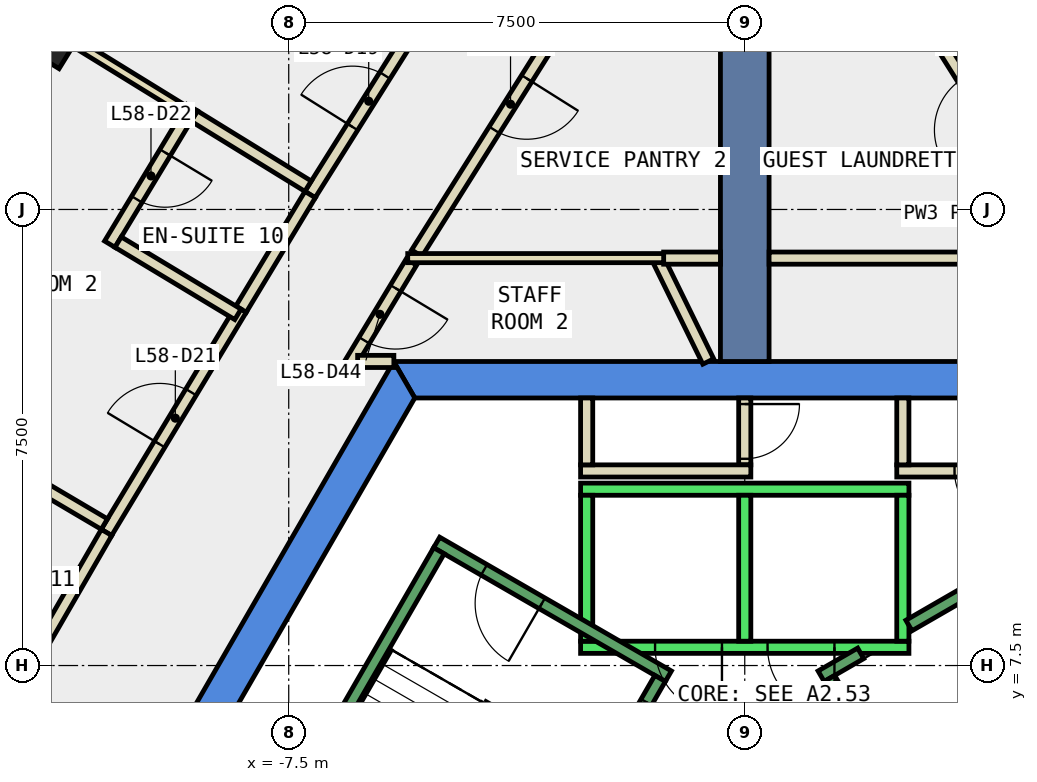
"""IFC4 building model, lengths in metres.
Left out: names, types, materials, properties, quantities, classifications, styles, units other than length and angle.
Written with IfcOpenShell. Run it as: python <this file> out.ifc"""

import sys

from ifc_helpers import new_model, si_unit, direction, frame, frame_2d, origin, origin_2d, place, context, subcontext, project, spatial, polyline, rectangle, outline, extrude, element, fill, save


model = new_model("IFC4")
c1 = context("Model", 3, precision=1e-05, world=origin(), true_north=direction((0.0, 1.0)))
c2 = subcontext(c1, "Body", "Model", "MODEL_VIEW")
j1 = project(units=[si_unit("LENGTHUNIT", "METRE"), si_unit("PLANEANGLEUNIT", "RADIAN")], contexts=[c1])
p1 = place(None, origin())
s1 = spatial("IfcSite", under=j1, at=p1, CompositionType="ELEMENT")
p2 = place(p1, origin())
s2 = spatial("IfcBuilding", under=s1, at=p2, CompositionType="ELEMENT")
p3 = place(p2, frame((0.0, 0.0, 255.8)))
s3 = spatial("IfcBuildingStorey", under=s2, at=p3, CompositionType="ELEMENT", Elevation=255.8)
p4 = place(p3, frame((-11.61, 18.109, -0.34), z_axis=(0.0, 0.0, 1.0), x_axis=(0.525575593337, 0.850746904601, 0.0)))
e1 = element("IfcColumn", 1, at=p4, inside=s3, PredefinedType="COLUMN", context=c2, shape_type="SweptSolid", body=[
    extrude(rectangle(XDim=1.0, YDim=1.4, at=origin_2d()), origin(), (0.0, 0.0, 1.0), 3.6),
])
p5 = place(p3, frame((0.0, 0.0, -0.34)))
e2 = element("IfcWall", 2, at=p5, inside=s3, PredefinedType="SHEAR", context=c2, shape_type="SweptSolid", body=[
    extrude(outline(polyline([(5.774, 12.5), (-5.774, 12.5), (-5.427, 11.9), (5.427, 11.9), (5.774, 12.5)])), origin(), (0.0, 0.0, 1.0), 3.6),
])
p6 = place(p3, frame((0.0, 0.0, -0.34)))
e3 = element("IfcWall", 3, at=p6, inside=s3, PredefinedType="SHEAR", context=c2, shape_type="SweptSolid", body=[
    extrude(outline(polyline([(-10.535, 4.253), (-10.015, 3.953), (-5.427, 11.9), (-5.774, 12.5), (-10.535, 4.253)])), origin(), (0.0, 0.0, 1.0), 3.6),
])
p7 = place(p3, frame((0.0, 12.5, -0.34), z_axis=(0.0, 0.0, 1.0), x_axis=(0.0, 1.0, 0.0)))
e4 = element("IfcWall", 4, at=p7, inside=s3, PredefinedType="SHEAR", context=c2, shape_type="SweptSolid", body=[
    extrude(rectangle(XDim=9.0, YDim=0.8, at=frame_2d((4.5, 0.0))), origin(), (0.0, 0.0, 1.0), 3.6),
])
p8 = place(p3, frame((-0.6, 12.5, 0.0), z_axis=(0.0, 0.0, 1.0), x_axis=(-0.440531456598, 0.897737175206, 0.0)))
e5 = element("IfcWall", 5, at=p8, inside=s3, PredefinedType="PARTITIONING", context=c2, shape_type="SweptSolid", body=[
    extrude(rectangle(XDim=1.918, YDim=0.2, at=frame_2d((0.959, 0.0))), origin(), (0.0, 0.0, 1.0), 3.26),
])
p9 = place(p3, frame((-5.482, 14.136, 0.0), z_axis=(0.0, 0.0, 1.0), x_axis=(-0.516156559549, -0.856494253357, 0.0)))
e6 = element("IfcWall", 6, at=p9, inside=s3, PredefinedType="PARTITIONING", context=c2, shape_type="SweptSolid", body=[
    extrude(rectangle(XDim=2.009, YDim=0.2, at=frame_2d((1.005, 0.0))), origin(), (0.0, 0.0, 1.0), 3.26),
])
p10 = place(p9, frame((0.504, 0.0, 0.0)))
e7 = element("IfcOpeningElement", 7, at=p10, cuts=e6, PredefinedType="OPENING", context=c2, shape_type="SweptSolid", body=[
    extrude(rectangle(XDim=1.0, YDim=2.1, at=frame_2d((0.5, 1.05))), frame((0.0, 0.11, 0.0), z_axis=(0.0, -1.0, 0.0), x_axis=(1.0, 0.0, 0.0)), (0.0, 0.0, 1.0), 0.22),
])
p11 = place(p3, frame((-6.367, 12.501, 0.0), z_axis=(0.0, 0.0, 1.0), x_axis=(1.0, 0.0, 0.0)))
e8 = element("IfcWall", 8, at=p11, inside=s3, PredefinedType="PARTITIONING", context=c2, shape_type="SweptSolid", body=[
    extrude(rectangle(XDim=0.596, YDim=0.2, at=frame_2d((0.298, 0.0))), origin(), (0.0, 0.0, 1.0), 3.26),
])
p12 = place(p3, frame((0.4, 14.2, 0.0), z_axis=(0.0, 0.0, 1.0), x_axis=(1.0, 0.0, 0.0)))
e9 = element("IfcWall", 9, at=p12, inside=s3, PredefinedType="PARTITIONING", context=c2, shape_type="SweptSolid", body=[
    extrude(rectangle(XDim=5.143, YDim=0.2, at=frame_2d((2.572, 0.0))), origin(), (0.0, 0.0, 1.0), 3.26),
])
p13 = place(p3, frame((5.394, 14.281, 0.0), z_axis=(0.0, 0.0, 1.0), x_axis=(-0.532551510955, 0.846397594621, 0.0)))
e10 = element("IfcWall", 10, at=p13, inside=s3, PredefinedType="PARTITIONING", context=c2, shape_type="SweptSolid", body=[
    extrude(rectangle(XDim=5.789, YDim=0.2, at=frame_2d((2.895, 0.0))), origin(), (0.0, 0.0, 1.0), 3.26),
])
p14 = place(p13, frame((2.394, 0.0, 0.0)))
e11 = element("IfcOpeningElement", 11, at=p14, cuts=e10, PredefinedType="OPENING", context=c2, shape_type="SweptSolid", body=[
    extrude(rectangle(XDim=1.0, YDim=2.1, at=frame_2d((0.5, 1.05))), frame((0.0, 0.11, 0.0), z_axis=(0.0, -1.0, 0.0), x_axis=(1.0, 0.0, 0.0)), (0.0, 0.0, 1.0), 0.22),
])
p15 = place(p3, frame((-1.334, 14.2, 0.0), z_axis=(0.0, 0.0, 1.0), x_axis=(1.0, 0.0, 0.0)))
e12 = element("IfcWall", 12, at=p15, inside=s3, PredefinedType="PARTITIONING", context=c2, shape_type="SweptSolid", body=[
    extrude(rectangle(XDim=0.934, YDim=0.2, at=frame_2d((0.467, 0.0))), origin(), (0.0, 0.0, 1.0), 3.26),
])
p16 = place(p3, frame((-2.311, 19.181, 0.0), z_axis=(0.0, 0.0, 1.0), x_axis=(-0.532551510955, -0.846397594621, 0.0)))
e13 = element("IfcWall", 13, at=p16, inside=s3, PredefinedType="PARTITIONING", context=c2, shape_type="SweptSolid", body=[
    extrude(rectangle(XDim=5.789, YDim=0.2, at=frame_2d((2.895, 0.0))), origin(), (0.0, 0.0, 1.0), 3.26),
])
p17 = place(p16, frame((2.394, 0.0, 0.0)))
e14 = element("IfcOpeningElement", 14, at=p17, cuts=e13, PredefinedType="OPENING", context=c2, shape_type="SweptSolid", body=[
    extrude(rectangle(XDim=1.0, YDim=2.1, at=frame_2d((0.5, 1.05))), frame((0.0, 0.11, 0.0), z_axis=(0.0, -1.0, 0.0), x_axis=(1.0, 0.0, 0.0)), (0.0, 0.0, 1.0), 0.22),
])
p18 = place(p3, frame((-7.15, 15.246, 0.0), z_axis=(0.0, 0.0, 1.0), x_axis=(0.532449518014, 0.846461759778, 0.0)))
e15 = element("IfcWall", 15, at=p18, inside=s3, PredefinedType="PARTITIONING", context=c2, shape_type="SweptSolid", body=[
    extrude(rectangle(XDim=3.525, YDim=0.2, at=frame_2d((1.763, 0.0))), origin(), (0.0, 0.0, 1.0), 3.26),
])
p19 = place(p18, frame((1.313, 0.0, 0.0)))
e16 = element("IfcOpeningElement", 16, at=p19, cuts=e15, PredefinedType="OPENING", context=c2, shape_type="SweptSolid", body=[
    extrude(rectangle(XDim=1.0, YDim=2.1, at=frame_2d((0.5, 1.05))), frame((0.0, 0.11, 0.0), z_axis=(0.0, -1.0, 0.0), x_axis=(1.0, 0.0, 0.0)), (0.0, 0.0, 1.0), 0.22),
])
p20 = place(p3, frame((-10.498, 9.689, 0.0), z_axis=(0.0, 0.0, 1.0), x_axis=(0.516353342298, 0.856375633643, 0.0)))
e17 = element("IfcWall", 17, at=p20, inside=s3, PredefinedType="PARTITIONING", context=c2, shape_type="SweptSolid", body=[
    extrude(rectangle(XDim=4.288, YDim=0.2, at=frame_2d((2.144, 0.0))), origin(), (0.0, 0.0, 1.0), 3.26),
])
p21 = place(p20, frame((1.694, 0.0, 0.0)))
e18 = element("IfcOpeningElement", 18, at=p21, cuts=e17, PredefinedType="OPENING", context=c2, shape_type="SweptSolid", body=[
    extrude(rectangle(XDim=1.0, YDim=2.1, at=frame_2d((0.5, 1.05))), frame((0.0, 0.11, 0.0), z_axis=(0.0, -1.0, 0.0), x_axis=(1.0, 0.0, 0.0)), (0.0, 0.0, 1.0), 0.22),
])
p22 = place(p3, frame((-8.284, 13.361, 0.0), z_axis=(0.0, 0.0, 1.0), x_axis=(0.516354965559, 0.856374654893, 0.0)))
e19 = element("IfcWall", 19, at=p22, inside=s3, PredefinedType="PARTITIONING", context=c2, shape_type="SweptSolid", body=[
    extrude(rectangle(XDim=2.2, YDim=0.2, at=frame_2d((1.1, 0.0))), origin(), (0.0, 0.0, 1.0), 3.26),
])
p23 = place(p3, frame((-11.696, 7.61, 0.0), z_axis=(0.0, 0.0, 1.0), x_axis=(0.500089422704, 0.865973769406, 0.0)))
e20 = element("IfcWall", 20, at=p23, inside=s3, PredefinedType="PARTITIONING", context=c2, shape_type="SweptSolid", body=[
    extrude(rectangle(XDim=2.399, YDim=0.2, at=frame_2d((1.2, 0.0))), origin(), (0.0, 0.0, 1.0), 3.26),
])
p24 = place(p3, frame((5.3, 10.7, 0.0), z_axis=(0.0, 0.0, 1.0), x_axis=(-1.0, 0.0, 0.0)))
e21 = element("IfcWall", 21, at=p24, inside=s3, PredefinedType="PARTITIONING", context=c2, shape_type="SweptSolid", body=[
    extrude(rectangle(XDim=2.8, YDim=0.2, at=frame_2d((1.4, 0.0))), origin(), (0.0, 0.0, 1.0), 3.26),
])
p25 = place(p24, frame((0.95, 0.0, 0.0)))
e22 = element("IfcOpeningElement", 22, at=p25, cuts=e21, PredefinedType="OPENING", context=c2, shape_type="SweptSolid", body=[
    extrude(rectangle(XDim=0.9, YDim=2.1, at=frame_2d((0.45, 1.05))), frame((0.0, 0.11, 0.0), z_axis=(0.0, -1.0, 0.0), x_axis=(1.0, 0.0, 0.0)), (0.0, 0.0, 1.0), 0.22),
])
p26 = place(p3, frame((2.6, 10.8, 0.0), z_axis=(0.0, 0.0, 1.0), x_axis=(0.0, 1.0, 0.0)))
e23 = element("IfcWall", 23, at=p26, inside=s3, PredefinedType="PARTITIONING", context=c2, shape_type="SweptSolid", body=[
    extrude(rectangle(XDim=1.1, YDim=0.2, at=frame_2d((0.55, 0.0))), origin(), (0.0, 0.0, 1.0), 3.26),
])
p27 = place(p3, frame((0.0, 11.9, 0.0), z_axis=(0.0, 0.0, 1.0), x_axis=(0.0, -1.0, 0.0)))
e24 = element("IfcWall", 24, at=p27, inside=s3, PredefinedType="PARTITIONING", context=c2, shape_type="SweptSolid", body=[
    extrude(rectangle(XDim=1.1, YDim=0.2, at=frame_2d((0.55, 0.0))), origin(), (0.0, 0.0, 1.0), 3.26),
])
p28 = place(p27, frame((0.1, 0.0, 0.0)))
e25 = element("IfcOpeningElement", 25, at=p28, cuts=e24, PredefinedType="OPENING", context=c2, shape_type="SweptSolid", body=[
    extrude(rectangle(XDim=0.9, YDim=2.1, at=frame_2d((0.45, 1.05))), frame((0.0, 0.11, 0.0), z_axis=(0.0, -1.0, 0.0), x_axis=(1.0, 0.0, 0.0)), (0.0, 0.0, 1.0), 0.22),
])
p29 = place(p3, frame((0.1, 10.7, 0.0), z_axis=(0.0, 0.0, 1.0), x_axis=(-1.0, 0.0, 0.0)))
e26 = element("IfcWall", 26, at=p29, inside=s3, PredefinedType="PARTITIONING", context=c2, shape_type="SweptSolid", body=[
    extrude(rectangle(XDim=2.8, YDim=0.2, at=frame_2d((1.4, 0.0))), origin(), (0.0, 0.0, 1.0), 3.26),
])
p30 = place(p3, frame((-2.6, 10.8, 0.0), z_axis=(0.0, 0.0, 1.0), x_axis=(0.0, 1.0, 0.0)))
e27 = element("IfcWall", 27, at=p30, inside=s3, PredefinedType="PARTITIONING", context=c2, shape_type="SweptSolid", body=[
    extrude(rectangle(XDim=1.1, YDim=0.2, at=frame_2d((0.55, 0.0))), origin(), (0.0, 0.0, 1.0), 3.26),
])
p31 = place(p3, frame((-1.334, 14.2, 0.0), z_axis=(0.0, 0.0, 1.0), x_axis=(-1.0, 0.0, 0.0)))
e28 = element("IfcWall", 28, at=p31, inside=s3, PredefinedType="PARTITIONING", context=c2, shape_type="SweptSolid", body=[
    extrude(rectangle(XDim=4.209, YDim=0.15, at=frame_2d((2.104, 0.0))), origin(), (0.0, 0.0, 1.0), 3.26),
])
p32 = place(p3, frame((-9.225, 16.641, 0.0), z_axis=(0.0, 0.0, 1.0), x_axis=(-0.85144868382, 0.524437926566, 0.0)))
e29 = element("IfcWall", 29, at=p32, inside=s3, PredefinedType="PARTITIONING", context=c2, shape_type="SweptSolid", body=[
    extrude(rectangle(XDim=2.08, YDim=0.15, at=frame_2d((1.04, 0.0))), origin(), (0.0, 0.0, 1.0), 3.26),
])
p33 = place(p3, frame((-7.182, 15.383, 0.0), z_axis=(0.0, 0.0, 1.0), x_axis=(-0.851498142432, 0.524357619792, 0.0)))
e30 = element("IfcWall", 30, at=p33, inside=s3, PredefinedType="PARTITIONING", context=c2, shape_type="SweptSolid", body=[
    extrude(rectangle(XDim=2.198, YDim=0.2, at=frame_2d((1.099, 0.0))), origin(), (0.0, 0.0, 1.0), 3.26),
])
p34 = place(p3, frame((-9.088, 16.674, 0.0), z_axis=(0.0, 0.0, 1.0), x_axis=(-0.516780274192, -0.856118069081, 0.0)))
e31 = element("IfcWall", 31, at=p34, inside=s3, PredefinedType="PARTITIONING", context=c2, shape_type="SweptSolid", body=[
    extrude(rectangle(XDim=2.623, YDim=0.2, at=frame_2d((1.311, 0.0))), origin(), (0.0, 0.0, 1.0), 3.26),
])
p35 = place(p34, frame((0.861, 0.0, 0.0)))
e32 = element("IfcOpeningElement", 32, at=p35, cuts=e31, PredefinedType="OPENING", context=c2, shape_type="SweptSolid", body=[
    extrude(rectangle(XDim=0.9, YDim=2.1, at=frame_2d((0.45, 1.05))), frame((0.0, 0.11, 0.0), z_axis=(0.0, -1.0, 0.0), x_axis=(1.0, 0.0, 0.0)), (0.0, 0.0, 1.0), 0.22),
])
p36 = place(p3, frame((-10.306, 14.463, 0.0), z_axis=(0.0, 0.0, 1.0), x_axis=(0.856338986581, -0.51641411683, 0.0)))
e33 = element("IfcWall", 33, at=p36, inside=s3, PredefinedType="PARTITIONING", context=c2, shape_type="SweptSolid", body=[
    extrude(rectangle(XDim=2.301, YDim=0.2, at=frame_2d((1.15, 0.0))), origin(), (0.0, 0.0, 1.0), 3.26),
])
p37 = place(p3, frame((-10.532, 9.826, 0.0), z_axis=(0.0, 0.0, 1.0), x_axis=(-0.861311086958, 0.508077958077, 0.0)))
e34 = element("IfcWall", 34, at=p37, inside=s3, PredefinedType="PARTITIONING", context=c2, shape_type="SweptSolid", body=[
    extrude(rectangle(XDim=2.299, YDim=0.2, at=frame_2d((1.149, 0.0))), origin(), (0.0, 0.0, 1.0), 3.26),
])
p38 = place(p3, frame((2.7, 7.8, 0.0), z_axis=(0.0, 0.0, 1.0), x_axis=(-1.0, 0.0, 0.0)))
e35 = element("IfcWall", 35, at=p38, inside=s3, PredefinedType="STANDARD", context=c2, shape_type="SweptSolid", body=[
    extrude(rectangle(XDim=5.4, YDim=0.2, at=frame_2d((2.7, 0.0))), origin(), (0.0, 0.0, 1.0), 3.26),
])
p39 = place(p38, frame((1.225, 0.0, 0.0)))
e36 = element("IfcOpeningElement", 36, at=p39, cuts=e35, PredefinedType="OPENING", context=c2, shape_type="SweptSolid", body=[
    extrude(rectangle(XDim=1.1, YDim=2.1, at=frame_2d((0.55, 1.05))), frame((0.0, 0.11, 0.0), z_axis=(0.0, -1.0, 0.0), x_axis=(1.0, 0.0, 0.0)), (0.0, 0.0, 1.0), 0.22),
])
p40 = place(p38, frame((3.075, 0.0, 0.0)))
e37 = element("IfcOpeningElement", 37, at=p40, cuts=e35, PredefinedType="OPENING", context=c2, shape_type="SweptSolid", body=[
    extrude(rectangle(XDim=1.1, YDim=2.1, at=frame_2d((0.55, 1.05))), frame((0.0, 0.11, 0.0), z_axis=(0.0, -1.0, 0.0), x_axis=(1.0, 0.0, 0.0)), (0.0, 0.0, 1.0), 0.22),
])
p41 = place(p3, frame((2.7, 10.4, 0.0), z_axis=(0.0, 0.0, 1.0), x_axis=(-1.0, 0.0, 0.0)))
e38 = element("IfcWall", 38, at=p41, inside=s3, PredefinedType="STANDARD", context=c2, shape_type="SweptSolid", body=[
    extrude(rectangle(XDim=5.4, YDim=0.2, at=frame_2d((2.7, 0.0))), origin(), (0.0, 0.0, 1.0), 3.26),
])
for number, where, z_axis, x_axis in (
    (39, (2.6, 7.9, 0.0), (0.0, 0.0, 1.0), (0.0, 1.0, 0.0)),
    (40, (0.0, 7.9, 0.0), (0.0, 0.0, 1.0), (0.0, 1.0, 0.0)),
    (41, (-2.6, 7.9, 0.0), (0.0, 0.0, 1.0), (0.0, 1.0, 0.0)),
):
    element("IfcWall", number, at=place(p3, frame(where, z_axis=z_axis, x_axis=x_axis)), inside=s3, PredefinedType="STANDARD", context=c2, shape_type="SweptSolid", body=[
        extrude(rectangle(XDim=2.4, YDim=0.2, at=frame_2d((1.2, 0.0))), origin(), (0.0, 0.0, 1.0), 3.26),
    ])
p42 = place(p3, frame((2.7, 8.158, 0.0), z_axis=(0.0, 0.0, 1.0), x_axis=(0.86611865017, 0.499838457731, 0.0)))
e42 = element("IfcWall", 42, at=p42, inside=s3, PredefinedType="STANDARD", context=c2, shape_type="SweptSolid", body=[
    extrude(rectangle(XDim=2.733, YDim=0.2, at=frame_2d((1.366, 0.0))), origin(), (0.0, 0.0, 1.0), 3.26),
])
p43 = place(p3, frame((1.256, 7.324, 0.0), z_axis=(0.0, 0.0, 1.0), x_axis=(0.865915093549, 0.500191014278, 0.0)))
e43 = element("IfcWall", 43, at=p43, inside=s3, PredefinedType="STANDARD", context=c2, shape_type="SweptSolid", body=[
    extrude(rectangle(XDim=0.752, YDim=0.2, at=frame_2d((0.376, 0.0))), origin(), (0.0, 0.0, 1.0), 3.26),
])
p44 = place(p3, frame((4.843, 1.312, 0.0), z_axis=(0.0, 0.0, 1.0), x_axis=(-0.499963383562, 0.866046543262, 0.0)))
e44 = element("IfcWall", 44, at=p44, inside=s3, PredefinedType="STANDARD", context=c2, shape_type="SweptSolid", body=[
    extrude(rectangle(XDim=6.9, YDim=0.2, at=frame_2d((3.45, 0.0))), origin(), (0.0, 0.0, 1.0), 3.26),
])
p45 = place(p44, frame((0.45, 0.0, 0.0)))
e45 = element("IfcOpeningElement", 45, at=p45, cuts=e44, PredefinedType="OPENING", context=c2, shape_type="SweptSolid", body=[
    extrude(rectangle(XDim=1.1, YDim=2.2, at=frame_2d((0.55, 1.1))), frame((0.0, 0.11, 0.0), z_axis=(0.0, -1.0, 0.0), x_axis=(1.0, 0.0, 0.0)), (0.0, 0.0, 1.0), 0.22),
])
p46 = place(p3, frame((-1.256, 7.324, 0.0), z_axis=(0.0, 0.0, 1.0), x_axis=(-0.866046073146, 0.499964197906, 0.0)))
e46 = element("IfcWall", 46, at=p46, inside=s3, PredefinedType="STANDARD", context=c2, shape_type="SweptSolid", body=[
    extrude(rectangle(XDim=4.4, YDim=0.2, at=frame_2d((2.2, 0.0))), origin(), (0.0, 0.0, 1.0), 3.26),
])
p47 = place(p46, frame((2.4, 0.0, 0.0)))
e47 = element("IfcOpeningElement", 47, at=p47, cuts=e46, PredefinedType="OPENING", context=c2, shape_type="SweptSolid", body=[
    extrude(rectangle(XDim=1.1, YDim=2.2, at=frame_2d((0.55, 1.1))), frame((0.0, 0.11, 0.0), z_axis=(0.0, -1.0, 0.0), x_axis=(1.0, 0.0, 0.0)), (0.0, 0.0, 1.0), 0.22),
])
p48 = place(p3, frame((-1.393, 7.288, 0.0), z_axis=(0.0, 0.0, 1.0), x_axis=(-0.499963383562, -0.866046543262, 0.0)))
e48 = element("IfcWall", 48, at=p48, inside=s3, PredefinedType="STANDARD", context=c2, shape_type="SweptSolid", body=[
    extrude(rectangle(XDim=6.9, YDim=0.2, at=frame_2d((3.45, 0.0))), origin(), (0.0, 0.0, 1.0), 3.26),
])
p49 = place(p48, frame((0.45, 0.0, 0.0)))
e49 = element("IfcOpeningElement", 49, at=p49, cuts=e48, PredefinedType="OPENING", context=c2, shape_type="SweptSolid", body=[
    extrude(rectangle(XDim=1.1, YDim=2.2, at=frame_2d((0.55, 1.1))), frame((0.0, 0.11, 0.0), z_axis=(0.0, -1.0, 0.0), x_axis=(1.0, 0.0, 0.0)), (0.0, 0.0, 1.0), 0.22),
])
p50 = place(p3, frame((-5.03, 9.388, 0.0), z_axis=(0.0, 0.0, 1.0), x_axis=(-0.499978703459, -0.866037698999, 0.0)))
e50 = element("IfcWall", 50, at=p50, inside=s3, PredefinedType="STANDARD", context=c2, shape_type="SweptSolid", body=[
    extrude(rectangle(XDim=6.9, YDim=0.2, at=frame_2d((3.45, 0.0))), origin(), (0.0, 0.0, 1.0), 3.26),
])
p51 = place(p19, origin())
e51 = element("IfcDoor", 51, at=p51, inside=s3, OperationType="SINGLE_SWING_RIGHT", PredefinedType="DOOR", context=c2, shape_type="SweptSolid", body=[
    extrude(rectangle(XDim=1.0, YDim=2.1, at=frame_2d((0.5, 1.05))), frame((0.0, 0.025, 0.0), z_axis=(0.0, -1.0, 0.0), x_axis=(1.0, 0.0, 0.0)), (0.0, 0.0, 1.0), 0.05),
])
fill(e16, e51)
p52 = place(p21, origin())
e52 = element("IfcDoor", 52, at=p52, inside=s3, OperationType="SINGLE_SWING_RIGHT", PredefinedType="DOOR", context=c2, shape_type="SweptSolid", body=[
    extrude(rectangle(XDim=1.0, YDim=2.1, at=frame_2d((0.5, 1.05))), frame((0.0, 0.025, 0.0), z_axis=(0.0, -1.0, 0.0), x_axis=(1.0, 0.0, 0.0)), (0.0, 0.0, 1.0), 0.05),
])
fill(e18, e52)
p53 = place(p35, origin())
e53 = element("IfcDoor", 53, at=p53, inside=s3, OperationType="SINGLE_SWING_LEFT", PredefinedType="DOOR", context=c2, shape_type="SweptSolid", body=[
    extrude(rectangle(XDim=0.9, YDim=2.1, at=frame_2d((0.45, 1.05))), frame((0.0, 0.025, 0.0), z_axis=(0.0, -1.0, 0.0), x_axis=(1.0, 0.0, 0.0)), (0.0, 0.0, 1.0), 0.05),
])
fill(e32, e53)
p54 = place(p17, origin())
e54 = element("IfcDoor", 54, at=p54, inside=s3, OperationType="SINGLE_SWING_LEFT", PredefinedType="DOOR", context=c2, shape_type="SweptSolid", body=[
    extrude(rectangle(XDim=1.0, YDim=2.1, at=frame_2d((0.5, 1.05))), frame((0.0, 0.025, 0.0), z_axis=(0.0, -1.0, 0.0), x_axis=(1.0, 0.0, 0.0)), (0.0, 0.0, 1.0), 0.05),
])
fill(e14, e54)
p55 = place(p10, origin())
e55 = element("IfcDoor", 55, at=p55, inside=s3, OperationType="SINGLE_SWING_LEFT", PredefinedType="DOOR", context=c2, shape_type="SweptSolid", body=[
    extrude(rectangle(XDim=1.0, YDim=2.1, at=frame_2d((0.5, 1.05))), frame((0.0, 0.025, 0.0), z_axis=(0.0, -1.0, 0.0), x_axis=(1.0, 0.0, 0.0)), (0.0, 0.0, 1.0), 0.05),
])
fill(e7, e55)
p56 = place(p25, origin())
e56 = element("IfcDoor", 56, at=p56, inside=s3, OperationType="SINGLE_SWING_RIGHT", PredefinedType="DOOR", context=c2, shape_type="SweptSolid", body=[
    extrude(rectangle(XDim=0.9, YDim=2.1, at=frame_2d((0.45, 1.05))), frame((0.0, 0.025, 0.0), z_axis=(0.0, -1.0, 0.0), x_axis=(1.0, 0.0, 0.0)), (0.0, 0.0, 1.0), 0.05),
])
fill(e22, e56)
p57 = place(p28, origin())
e57 = element("IfcDoor", 57, at=p57, inside=s3, OperationType="SINGLE_SWING_LEFT", PredefinedType="DOOR", context=c2, shape_type="SweptSolid", body=[
    extrude(rectangle(XDim=0.9, YDim=2.1, at=frame_2d((0.45, 1.05))), frame((0.0, 0.025, 0.0), z_axis=(0.0, -1.0, 0.0), x_axis=(1.0, 0.0, 0.0)), (0.0, 0.0, 1.0), 0.05),
])
fill(e25, e57)
p58 = place(p39, origin())
e58 = element("IfcDoor", 58, at=p58, inside=s3, OperationType="SLIDING_TO_LEFT", PredefinedType="DOOR", context=c2, shape_type="SweptSolid", body=[
    extrude(rectangle(XDim=1.1, YDim=2.1, at=frame_2d((0.55, 1.05))), frame((0.0, 0.025, 0.0), z_axis=(0.0, -1.0, 0.0), x_axis=(1.0, 0.0, 0.0)), (0.0, 0.0, 1.0), 0.05),
])
fill(e36, e58)
p59 = place(p40, origin())
e59 = element("IfcDoor", 59, at=p59, inside=s3, OperationType="SLIDING_TO_LEFT", PredefinedType="DOOR", context=c2, shape_type="SweptSolid", body=[
    extrude(rectangle(XDim=1.1, YDim=2.1, at=frame_2d((0.55, 1.05))), frame((0.0, 0.025, 0.0), z_axis=(0.0, -1.0, 0.0), x_axis=(1.0, 0.0, 0.0)), (0.0, 0.0, 1.0), 0.05),
])
fill(e37, e59)
p60 = place(p49, origin())
e60 = element("IfcDoor", 60, at=p60, inside=s3, OperationType="SINGLE_SWING_LEFT", PredefinedType="DOOR", context=c2, shape_type="SweptSolid", body=[
    extrude(rectangle(XDim=1.1, YDim=2.2, at=frame_2d((0.55, 1.1))), frame((0.0, 0.025, 0.0), z_axis=(0.0, -1.0, 0.0), x_axis=(1.0, 0.0, 0.0)), (0.0, 0.0, 1.0), 0.05),
])
fill(e49, e60)
p61 = place(p47, origin())
e61 = element("IfcDoor", 61, at=p61, inside=s3, OperationType="SINGLE_SWING_LEFT", PredefinedType="DOOR", context=c2, shape_type="SweptSolid", body=[
    extrude(rectangle(XDim=1.1, YDim=2.2, at=frame_2d((0.55, 1.1))), frame((0.0, 0.025, 0.0), z_axis=(0.0, -1.0, 0.0), x_axis=(1.0, 0.0, 0.0)), (0.0, 0.0, 1.0), 0.05),
])
fill(e47, e61)
save(model, sys.argv[1])
